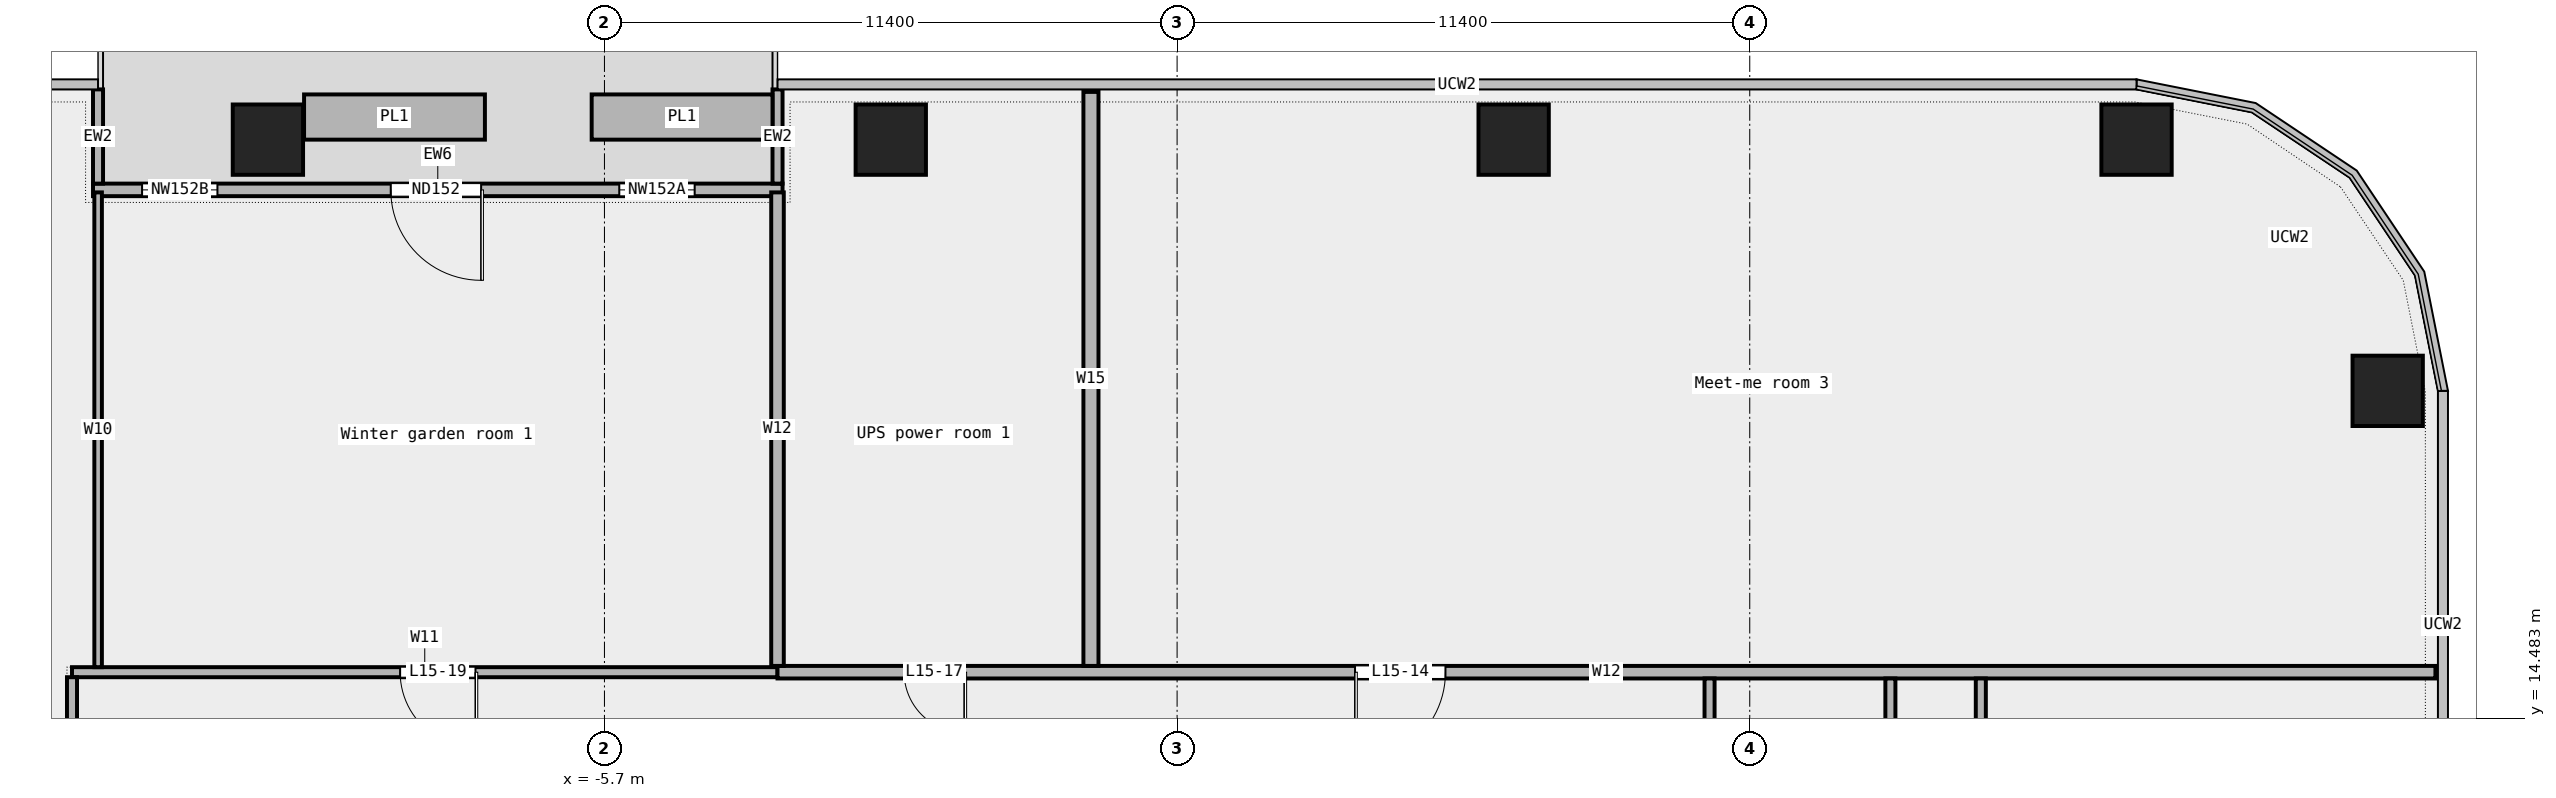
"""IFC4 building model, lengths in metres.
Left out: names, types, materials, properties, quantities, classifications, styles, units other than length and angle.
Written with IfcOpenShell. Run it as: python <this file> out.ifc"""

import sys

from ifc_helpers import new_model, si_unit, direction, frame, frame_2d, origin, origin_2d, place, context, subcontext, project, spatial, rectangle, extrude, element, fill, save


model = new_model("IFC4")
c1 = context("Model", 3, precision=1e-05, world=origin(), true_north=direction((0.0, 1.0)))
c2 = subcontext(c1, "Body", "Model", "MODEL_VIEW")
j1 = project(units=[si_unit("LENGTHUNIT", "METRE"), si_unit("PLANEANGLEUNIT", "RADIAN")], contexts=[c1])
p1 = place(None, origin())
s1 = spatial("IfcSite", under=j1, at=p1, CompositionType="ELEMENT")
p2 = place(p1, origin())
s2 = spatial("IfcBuilding", under=s1, at=p2, CompositionType="ELEMENT")
p3 = place(p2, frame((0.0, 0.0, 79.0)))
s3 = spatial("IfcBuildingStorey", under=s2, at=p3, CompositionType="ELEMENT", Elevation=79.0)
for number, where, z_axis, x_axis in (
    (1, (29.8, 21.0, 0.0), (0.0, 0.0, 1.0), (1.0, 0.0, 0.0)),
    (2, (24.8, 26.0, 0.0), (0.0, 0.0, 1.0), (1.0, 0.0, 0.0)),
    (3, (12.4, 26.0, 0.0), (0.0, 0.0, 1.0), (1.0, 0.0, 0.0)),
    (4, (0.0, 26.0, 0.0), (0.0, 0.0, 1.0), (1.0, 0.0, 0.0)),
    (5, (-12.4, 26.0, 0.0), (0.0, 0.0, 1.0), (1.0, 0.0, 0.0)),
):
    element("IfcColumn", number, at=place(p3, frame(where, z_axis=z_axis, x_axis=x_axis)), inside=s3, PredefinedType="COLUMN", context=c2, shape_type="SweptSolid", body=[
        extrude(rectangle(XDim=1.4, YDim=1.4, at=origin_2d()), origin(), (0.0, 0.0, 1.0), 4.35),
    ])
p4 = place(p3, frame((-2.155, 25.0, 0.0), z_axis=(0.0, 0.0, 1.0), x_axis=(-1.0, 0.0, 0.0)))
e6 = element("IfcWall", 6, at=p4, inside=s3, PredefinedType="STANDARD", context=c2, shape_type="SweptSolid", body=[
    extrude(rectangle(XDim=13.727, YDim=0.25, at=frame_2d((6.864, 0.0))), origin(), (0.0, 0.0, 1.0), 4.35),
])
p5 = place(p4, frame((1.75, 0.0, 0.45)))
e7 = element("IfcOpeningElement", 7, at=p5, cuts=e6, PredefinedType="OPENING", context=c2, shape_type="SweptSolid", body=[
    extrude(rectangle(XDim=1.5, YDim=3.0, at=frame_2d((0.75, 1.5))), frame((0.0, 0.137, 0.0), z_axis=(0.0, -1.0, 0.0), x_axis=(1.0, 0.0, 0.0)), (0.0, 0.0, 1.0), 0.274),
])
p6 = place(p4, frame((6.0, 0.0, 0.0)))
e8 = element("IfcOpeningElement", 8, at=p6, cuts=e6, PredefinedType="OPENING", context=c2, shape_type="SweptSolid", body=[
    extrude(rectangle(XDim=1.8, YDim=2.4, at=frame_2d((0.9, 1.2))), frame((0.0, 0.137, 0.0), z_axis=(0.0, -1.0, 0.0), x_axis=(1.0, 0.0, 0.0)), (0.0, 0.0, 1.0), 0.274),
])
p7 = place(p4, frame((11.25, 0.0, 0.45)))
e9 = element("IfcOpeningElement", 9, at=p7, cuts=e6, PredefinedType="OPENING", context=c2, shape_type="SweptSolid", body=[
    extrude(rectangle(XDim=1.5, YDim=3.0, at=frame_2d((0.75, 1.5))), frame((0.0, 0.137, 0.0), z_axis=(0.0, -1.0, 0.0), x_axis=(1.0, 0.0, 0.0)), (0.0, 0.0, 1.0), 0.274),
])
for number, where, z_axis, x_axis in (
    (10, (-2.255, 27.0, 0.0), (0.0, 0.0, 1.0), (0.0, -1.0, 0.0)),
    (11, (-15.782, 27.0, 0.0), (0.0, 0.0, 1.0), (0.0, -1.0, 0.0)),
):
    element("IfcWall", number, at=place(p3, frame(where, z_axis=z_axis, x_axis=x_axis)), inside=s3, PredefinedType="STANDARD", context=c2, shape_type="SweptSolid", body=[
        extrude(rectangle(XDim=1.875, YDim=0.2, at=frame_2d((0.938, 0.0))), origin(), (0.0, 0.0, 1.0), 4.35),
    ])
for number, where, z_axis, x_axis in (
    (12, (-2.354, 26.45, 0.0), (0.0, 0.0, 1.0), (-1.0, 0.0, 0.0)),
    (13, (-8.08, 26.45, 0.0), (0.0, 0.0, 1.0), (-1.0, 0.0, 0.0)),
):
    element("IfcWall", number, at=place(p3, frame(where, z_axis=z_axis, x_axis=x_axis)), inside=s3, PredefinedType="STANDARD", context=c2, shape_type="SweptSolid", body=[
        extrude(rectangle(XDim=3.6, YDim=0.9, at=frame_2d((1.8, 0.0))), origin(), (0.0, 0.0, 1.0), 0.7),
    ])
p8 = place(p3, frame((-16.3, 15.4, 0.0), z_axis=(0.0, 0.0, 1.0), x_axis=(1.0, 0.0, 0.0)))
e14 = element("IfcWall", 14, at=p8, inside=s3, PredefinedType="PARTITIONING", context=c2, shape_type="SweptSolid", body=[
    extrude(rectangle(XDim=14.045, YDim=0.2, at=frame_2d((7.022, 0.0))), origin(), (0.0, 0.0, 1.0), 4.35),
])
p9 = place(p8, frame((6.532, 0.0, 0.0)))
e15 = element("IfcOpeningElement", 15, at=p9, cuts=e14, PredefinedType="OPENING", context=c2, shape_type="SweptSolid", body=[
    extrude(rectangle(XDim=1.5, YDim=2.1, at=frame_2d((0.75, 1.05))), frame((0.0, 0.112, 0.0), z_axis=(0.0, -1.0, 0.0), x_axis=(1.0, 0.0, 0.0)), (0.0, 0.0, 1.0), 0.224),
])
p10 = place(p3, frame((-2.255, 15.4, 0.0), z_axis=(0.0, 0.0, 1.0), x_axis=(1.0, 0.0, 0.0)))
e16 = element("IfcWall", 16, at=p10, inside=s3, PredefinedType="PARTITIONING", context=c2, shape_type="SweptSolid", body=[
    extrude(rectangle(XDim=33.005, YDim=0.25, at=frame_2d((16.502, 0.0))), origin(), (0.0, 0.0, 1.0), 4.35),
])
p11 = place(p10, frame((11.498, 0.0, 0.0)))
e17 = element("IfcOpeningElement", 17, at=p11, cuts=e16, PredefinedType="OPENING", context=c2, shape_type="SweptSolid", body=[
    extrude(rectangle(XDim=1.8, YDim=2.1, at=frame_2d((0.9, 1.05))), frame((0.0, 0.137, 0.0), z_axis=(0.0, -1.0, 0.0), x_axis=(1.0, 0.0, 0.0)), (0.0, 0.0, 1.0), 0.274),
])
p12 = place(p10, frame((2.52, 0.0, 0.0)))
e18 = element("IfcOpeningElement", 18, at=p12, cuts=e16, PredefinedType="OPENING", context=c2, shape_type="SweptSolid", body=[
    extrude(rectangle(XDim=1.2, YDim=2.1, at=frame_2d((0.6, 1.05))), frame((0.0, 0.137, 0.0), z_axis=(0.0, -1.0, 0.0), x_axis=(1.0, 0.0, 0.0)), (0.0, 0.0, 1.0), 0.274),
])
p13 = place(p3, frame((-16.3, 11.8, 0.0), z_axis=(0.0, 0.0, 1.0), x_axis=(0.0, 1.0, 0.0)))
e19 = element("IfcWall", 19, at=p13, inside=s3, PredefinedType="PARTITIONING", context=c2, shape_type="SweptSolid", body=[
    extrude(rectangle(XDim=3.5, YDim=0.2, at=frame_2d((1.75, 0.0))), origin(), (0.0, 0.0, 1.0), 4.35),
])
p14 = place(p3, frame((-15.78, 15.5, 0.0), z_axis=(0.0, 0.0, 1.0), x_axis=(0.0, 1.0, 0.0)))
e20 = element("IfcWall", 20, at=p14, inside=s3, PredefinedType="PARTITIONING", context=c2, shape_type="SweptSolid", body=[
    extrude(rectangle(XDim=9.45, YDim=0.15, at=frame_2d((4.725, 0.0))), origin(), (0.0, 0.0, 1.0), 4.35),
])
p15 = place(p3, frame((-2.255, 15.525, 0.0), z_axis=(0.0, 0.0, 1.0), x_axis=(0.0, 1.0, 0.0)))
e21 = element("IfcWall", 21, at=p15, inside=s3, PredefinedType="PARTITIONING", context=c2, shape_type="SweptSolid", body=[
    extrude(rectangle(XDim=9.425, YDim=0.25, at=frame_2d((4.712, 0.0))), origin(), (0.0, 0.0, 1.0), 4.35),
])
p16 = place(p3, frame((3.985, 15.525, 0.0), z_axis=(0.0, 0.0, 1.0), x_axis=(0.0, 1.0, 0.0)))
e22 = element("IfcWall", 22, at=p16, inside=s3, PredefinedType="PARTITIONING", context=c2, shape_type="SweptSolid", body=[
    extrude(rectangle(XDim=11.425, YDim=0.3, at=frame_2d((5.712, 0.0))), origin(), (0.0, 0.0, 1.0), 4.35),
])
p17 = place(p3, frame((16.3, 11.8, 0.0), z_axis=(0.0, 0.0, 1.0), x_axis=(0.0, 1.0, 0.0)))
e23 = element("IfcWall", 23, at=p17, inside=s3, PredefinedType="PARTITIONING", context=c2, shape_type="SweptSolid", body=[
    extrude(rectangle(XDim=3.475, YDim=0.2, at=frame_2d((1.737, 0.0))), origin(), (0.0, 0.0, 1.0), 4.35),
])
p18 = place(p3, frame((19.9, 7.91, 0.0), z_axis=(0.0, 0.0, 1.0), x_axis=(0.0, 1.0, 0.0)))
e24 = element("IfcWall", 24, at=p18, inside=s3, PredefinedType="PARTITIONING", context=c2, shape_type="SweptSolid", body=[
    extrude(rectangle(XDim=7.365, YDim=0.2, at=frame_2d((3.683, 0.0))), origin(), (0.0, 0.0, 1.0), 4.35),
])
p19 = place(p18, frame((3.232, 0.0, 0.0)))
e25 = element("IfcOpeningElement", 25, at=p19, cuts=e24, PredefinedType="OPENING", context=c2, shape_type="SweptSolid", body=[
    extrude(rectangle(XDim=0.9, YDim=2.1, at=frame_2d((0.45, 1.05))), frame((0.0, 0.112, 0.0), z_axis=(0.0, -1.0, 0.0), x_axis=(1.0, 0.0, 0.0)), (0.0, 0.0, 1.0), 0.224),
])
p20 = place(p3, frame((21.7, -2.21, 0.0), z_axis=(0.0, 0.0, 1.0), x_axis=(0.0, 1.0, 0.0)))
e26 = element("IfcWall", 26, at=p20, inside=s3, PredefinedType="PARTITIONING", context=c2, shape_type="SweptSolid", body=[
    extrude(rectangle(XDim=17.485, YDim=0.2, at=frame_2d((8.742, 0.0))), origin(), (0.0, 0.0, 1.0), 4.35),
])
p21 = place(p20, frame((15.23, 0.0, 0.0)))
e27 = element("IfcOpeningElement", 27, at=p21, cuts=e26, PredefinedType="OPENING", context=c2, shape_type="SweptSolid", body=[
    extrude(rectangle(XDim=0.9, YDim=2.1, at=frame_2d((0.45, 1.05))), frame((0.0, 0.112, 0.0), z_axis=(0.0, -1.0, 0.0), x_axis=(1.0, 0.0, 0.0)), (0.0, 0.0, 1.0), 0.224),
])
p22 = place(p20, frame((6.188, 0.0, 0.0)))
e28 = element("IfcOpeningElement", 28, at=p22, cuts=e26, PredefinedType="OPENING", context=c2, shape_type="SweptSolid", body=[
    extrude(rectangle(XDim=1.5, YDim=2.1, at=frame_2d((0.75, 1.05))), frame((0.0, 0.112, 0.0), z_axis=(0.0, -1.0, 0.0), x_axis=(1.0, 0.0, 0.0)), (0.0, 0.0, 1.0), 0.224),
])
p23 = place(p5, origin())
e29 = element("IfcWindow", 29, at=p23, inside=s3, PartitioningType="SINGLE_PANEL", PredefinedType="WINDOW", context=c2, shape_type="SweptSolid", body=[
    extrude(rectangle(XDim=1.5, YDim=3.0, at=frame_2d((0.75, 1.5))), frame((0.0, 0.03, 0.0), z_axis=(0.0, -1.0, 0.0), x_axis=(1.0, 0.0, 0.0)), (0.0, 0.0, 1.0), 0.06),
])
fill(e7, e29)
p24 = place(p6, origin())
e30 = element("IfcDoor", 30, at=p24, inside=s3, OperationType="DOUBLE_DOOR_SINGLE_SWING", PredefinedType="DOOR", context=c2, shape_type="SweptSolid", body=[
    extrude(rectangle(XDim=1.8, YDim=2.4, at=frame_2d((0.9, 1.2))), frame((0.0, 0.025, 0.0), z_axis=(0.0, -1.0, 0.0), x_axis=(1.0, 0.0, 0.0)), (0.0, 0.0, 1.0), 0.05),
])
fill(e8, e30)
p25 = place(p7, origin())
e31 = element("IfcWindow", 31, at=p25, inside=s3, PartitioningType="SINGLE_PANEL", PredefinedType="WINDOW", context=c2, shape_type="SweptSolid", body=[
    extrude(rectangle(XDim=1.5, YDim=3.0, at=frame_2d((0.75, 1.5))), frame((0.0, 0.03, 0.0), z_axis=(0.0, -1.0, 0.0), x_axis=(1.0, 0.0, 0.0)), (0.0, 0.0, 1.0), 0.06),
])
fill(e9, e31)
p26 = place(p11, origin())
e32 = element("IfcDoor", 32, at=p26, inside=s3, OperationType="DOUBLE_DOOR_SINGLE_SWING", PredefinedType="DOOR", context=c2, shape_type="SweptSolid", body=[
    extrude(rectangle(XDim=1.8, YDim=2.1, at=frame_2d((0.9, 1.05))), frame((0.0, 0.025, 0.0), z_axis=(0.0, -1.0, 0.0), x_axis=(1.0, 0.0, 0.0)), (0.0, 0.0, 1.0), 0.05),
])
fill(e17, e32)
p27 = place(p12, origin())
e33 = element("IfcDoor", 33, at=p27, inside=s3, OperationType="SINGLE_SWING_LEFT", PredefinedType="DOOR", context=c2, shape_type="SweptSolid", body=[
    extrude(rectangle(XDim=1.2, YDim=2.1, at=frame_2d((0.6, 1.05))), frame((0.0, 0.025, 0.0), z_axis=(0.0, -1.0, 0.0), x_axis=(1.0, 0.0, 0.0)), (0.0, 0.0, 1.0), 0.05),
])
fill(e18, e33)
p28 = place(p9, origin())
e34 = element("IfcDoor", 34, at=p28, inside=s3, OperationType="DOUBLE_DOOR_SINGLE_SWING", PredefinedType="DOOR", context=c2, shape_type="SweptSolid", body=[
    extrude(rectangle(XDim=1.5, YDim=2.1, at=frame_2d((0.75, 1.05))), frame((0.0, 0.025, 0.0), z_axis=(0.0, -1.0, 0.0), x_axis=(1.0, 0.0, 0.0)), (0.0, 0.0, 1.0), 0.05),
])
fill(e15, e34)
save(model, sys.argv[1])
